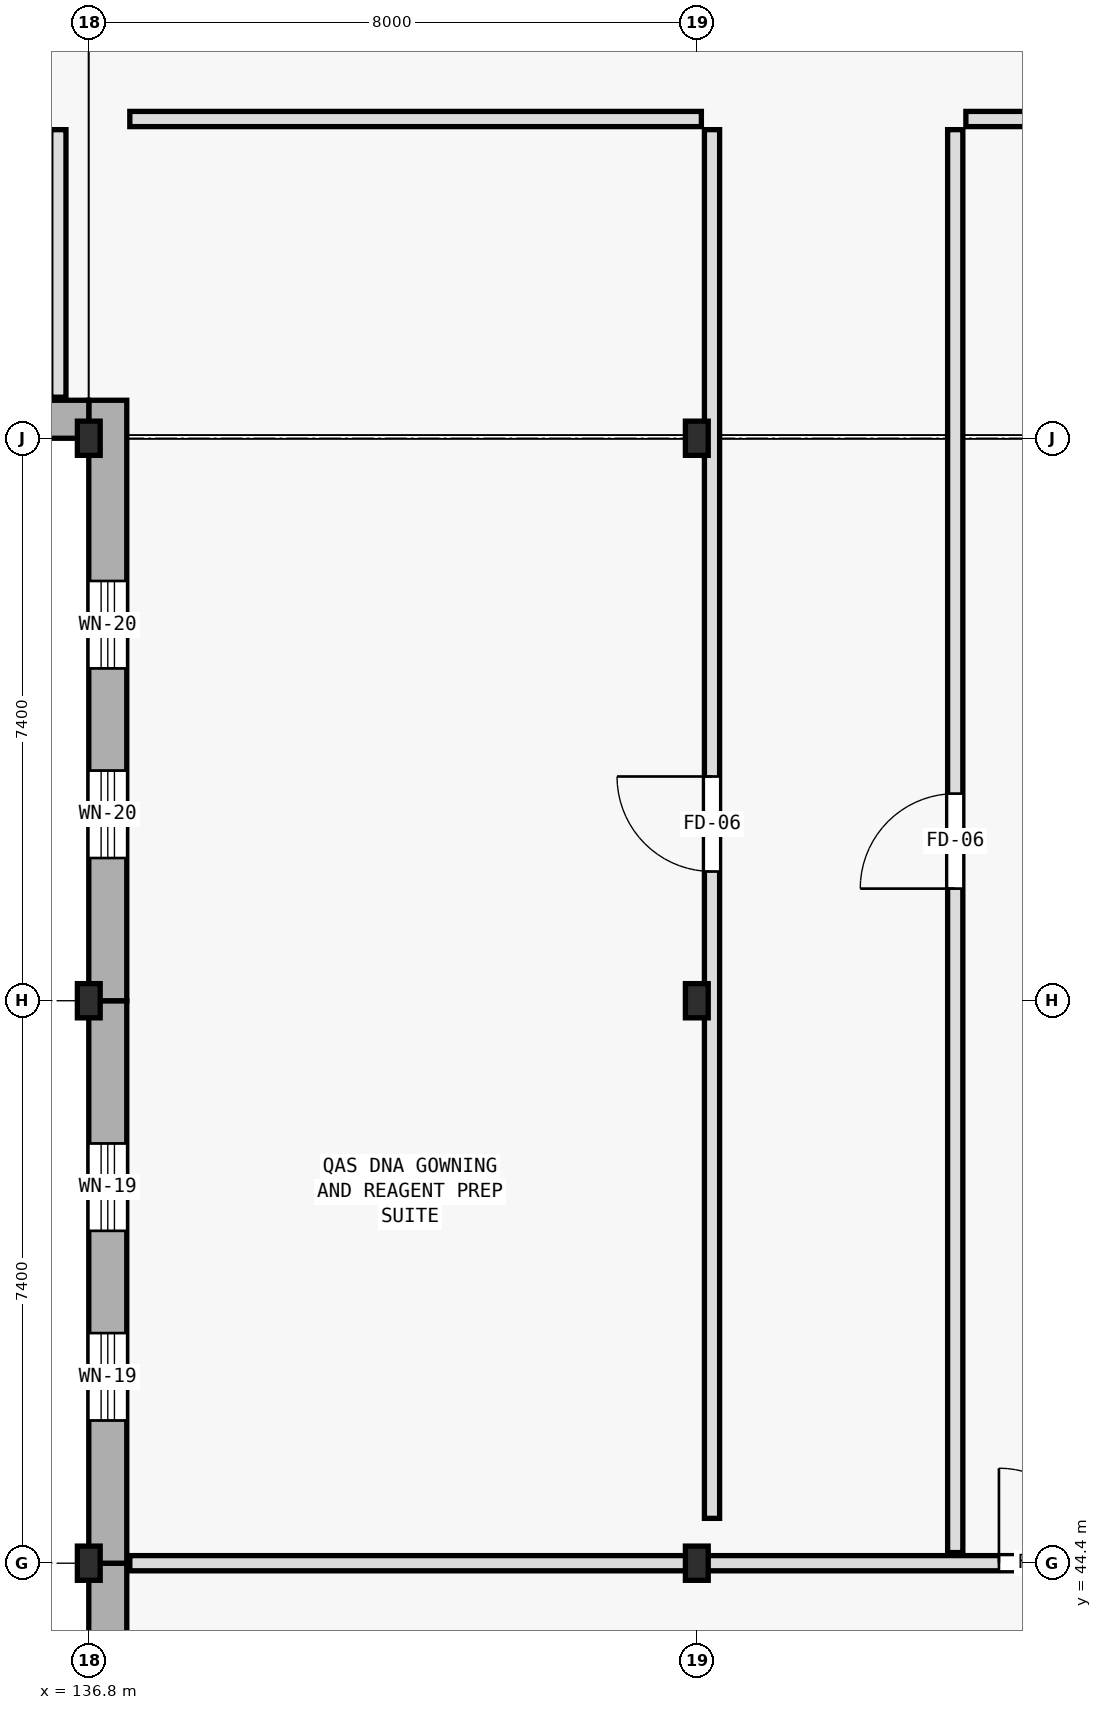
"""IFC4 building model, lengths in metres.
Left out: names, types, materials, properties, quantities, classifications, styles, units other than length and angle.
Written with IfcOpenShell. Run it as: python <this file> out.ifc"""

import sys

from ifc_helpers import new_model, si_unit, direction, frame, frame_2d, origin, origin_2d, place, context, subcontext, project, spatial, rectangle, i_section, extrude, element, fill, save


model = new_model("IFC4")
c1 = context("Model", 3, precision=1e-05, world=origin(), true_north=direction((0.0, 1.0)))
c2 = subcontext(c1, "Body", "Model", "MODEL_VIEW")
j1 = project(units=[si_unit("LENGTHUNIT", "METRE"), si_unit("PLANEANGLEUNIT", "RADIAN")], contexts=[c1])
p1 = place(None, origin())
s1 = spatial("IfcSite", under=j1, at=p1, CompositionType="ELEMENT")
p2 = place(p1, origin())
s2 = spatial("IfcBuilding", under=s1, at=p2, CompositionType="ELEMENT")
p3 = place(p2, frame((0.0, 0.0, 9.9)))
s3 = spatial("IfcBuildingStorey", under=s2, at=p3, CompositionType="ELEMENT", Elevation=9.9)
for number, where, z_axis, x_axis in (
    (1, (136.8, 44.4, 0.0), (0.0, 0.0, 1.0), (1.0, 0.0, 0.0)),
    (2, (136.8, 51.8, 0.0), (0.0, 0.0, 1.0), (1.0, 0.0, 0.0)),
    (3, (136.8, 59.2, 0.0), (0.0, 0.0, 1.0), (1.0, 0.0, 0.0)),
    (4, (144.8, 44.4, 0.0), (0.0, 0.0, 1.0), (1.0, 0.0, 0.0)),
    (5, (144.8, 51.8, 0.0), (0.0, 0.0, 1.0), (1.0, 0.0, 0.0)),
    (6, (144.8, 59.2, 0.0), (0.0, 0.0, 1.0), (1.0, 0.0, 0.0)),
):
    element("IfcColumn", number, at=place(p3, frame(where, z_axis=z_axis, x_axis=x_axis)), inside=s3, PredefinedType="COLUMN", context=c2, shape_type="SweptSolid", body=[
        extrude(i_section(OverallWidth=0.3, OverallDepth=0.45, WebThickness=0.014, FlangeThickness=0.026, FilletRadius=0.027, at=origin_2d()), origin(), (0.0, 0.0, 1.0), 4.2),
    ])
p4 = place(p3, frame((137.05, 37.0, 0.0), z_axis=(0.0, 0.0, 1.0), x_axis=(0.0, 1.0, 0.0)))
e7 = element("IfcWall", 7, at=p4, inside=s3, PredefinedType="STANDARD", context=c2, shape_type="SweptSolid", body=[
    extrude(rectangle(XDim=7.4, YDim=0.5, at=frame_2d((3.7, 0.0))), origin(), (0.0, 0.0, 1.0), 3.92),
])
p5 = place(p4, frame((1.978, 0.0, 0.9)))
e8 = element("IfcOpeningElement", 8, at=p5, cuts=e7, PredefinedType="OPENING", context=c2, shape_type="SweptSolid", body=[
    extrude(rectangle(XDim=0.95, YDim=2.2, at=frame_2d((0.475, 1.1))), frame((0.0, 0.26, 0.0), z_axis=(0.0, -1.0, 0.0), x_axis=(1.0, 0.0, 0.0)), (0.0, 0.0, 1.0), 0.52),
])
p6 = place(p4, frame((4.472, 0.0, 0.9)))
e9 = element("IfcOpeningElement", 9, at=p6, cuts=e7, PredefinedType="OPENING", context=c2, shape_type="SweptSolid", body=[
    extrude(rectangle(XDim=0.95, YDim=2.2, at=frame_2d((0.475, 1.1))), frame((0.0, 0.26, 0.0), z_axis=(0.0, -1.0, 0.0), x_axis=(1.0, 0.0, 0.0)), (0.0, 0.0, 1.0), 0.52),
])
p7 = place(p3, frame((137.05, 44.4, 0.0), z_axis=(0.0, 0.0, 1.0), x_axis=(0.0, 1.0, 0.0)))
e10 = element("IfcWall", 10, at=p7, inside=s3, PredefinedType="STANDARD", context=c2, shape_type="SweptSolid", body=[
    extrude(rectangle(XDim=7.4, YDim=0.5, at=frame_2d((3.7, 0.0))), origin(), (0.0, 0.0, 1.0), 3.955),
])
p8 = place(p7, frame((1.878, 0.0, 1.35)))
e11 = element("IfcOpeningElement", 11, at=p8, cuts=e10, PredefinedType="OPENING", context=c2, shape_type="SweptSolid", body=[
    extrude(rectangle(XDim=1.15, YDim=1.5, at=frame_2d((0.575, 0.75))), frame((0.0, 0.26, 0.0), z_axis=(0.0, -1.0, 0.0), x_axis=(1.0, 0.0, 0.0)), (0.0, 0.0, 1.0), 0.52),
])
p9 = place(p7, frame((4.372, 0.0, 1.35)))
e12 = element("IfcOpeningElement", 12, at=p9, cuts=e10, PredefinedType="OPENING", context=c2, shape_type="SweptSolid", body=[
    extrude(rectangle(XDim=1.15, YDim=1.5, at=frame_2d((0.575, 0.75))), frame((0.0, 0.26, 0.0), z_axis=(0.0, -1.0, 0.0), x_axis=(1.0, 0.0, 0.0)), (0.0, 0.0, 1.0), 0.52),
])
p10 = place(p3, frame((137.05, 51.8, 0.0), z_axis=(0.0, 0.0, 1.0), x_axis=(0.0, 1.0, 0.0)))
e13 = element("IfcWall", 13, at=p10, inside=s3, PredefinedType="STANDARD", context=c2, shape_type="SweptSolid", body=[
    extrude(rectangle(XDim=7.9, YDim=0.5, at=frame_2d((3.95, 0.0))), origin(), (0.0, 0.0, 1.0), 3.955),
])
p11 = place(p10, frame((1.878, 0.0, 0.9)))
e14 = element("IfcOpeningElement", 14, at=p11, cuts=e13, PredefinedType="OPENING", context=c2, shape_type="SweptSolid", body=[
    extrude(rectangle(XDim=1.15, YDim=1.85, at=frame_2d((0.575, 0.925))), frame((0.0, 0.26, 0.0), z_axis=(0.0, -1.0, 0.0), x_axis=(1.0, 0.0, 0.0)), (0.0, 0.0, 1.0), 0.52),
])
p12 = place(p10, frame((4.372, 0.0, 0.9)))
e15 = element("IfcOpeningElement", 15, at=p12, cuts=e13, PredefinedType="OPENING", context=c2, shape_type="SweptSolid", body=[
    extrude(rectangle(XDim=1.15, YDim=1.85, at=frame_2d((0.575, 0.925))), frame((0.0, 0.26, 0.0), z_axis=(0.0, -1.0, 0.0), x_axis=(1.0, 0.0, 0.0)), (0.0, 0.0, 1.0), 0.52),
])
p13 = place(p3, frame((136.8, 59.45, 0.0), z_axis=(0.0, 0.0, 1.0), x_axis=(-1.0, 0.0, 0.0)))
e16 = element("IfcWall", 16, at=p13, inside=s3, PredefinedType="STANDARD", context=c2, shape_type="SweptSolid", body=[
    extrude(rectangle(XDim=8.0, YDim=0.5, at=frame_2d((4.0, 0.0))), origin(), (0.0, 0.0, 1.0), 3.955),
])
p14 = place(p13, frame((1.993, 0.0, 1.35)))
e17 = element("IfcOpeningElement", 17, at=p14, cuts=e16, PredefinedType="OPENING", context=c2, shape_type="SweptSolid", body=[
    extrude(rectangle(XDim=1.25, YDim=1.65, at=frame_2d((0.625, 0.825))), frame((0.0, 0.26, 0.0), z_axis=(0.0, -1.0, 0.0), x_axis=(1.0, 0.0, 0.0)), (0.0, 0.0, 1.0), 0.52),
])
p15 = place(p13, frame((4.757, 0.0, 1.35)))
e18 = element("IfcOpeningElement", 18, at=p15, cuts=e16, PredefinedType="OPENING", context=c2, shape_type="SweptSolid", body=[
    extrude(rectangle(XDim=1.25, YDim=1.65, at=frame_2d((0.625, 0.825))), frame((0.0, 0.26, 0.0), z_axis=(0.0, -1.0, 0.0), x_axis=(1.0, 0.0, 0.0)), (0.0, 0.0, 1.0), 0.52),
])
p16 = place(p3, frame((136.4, 59.74, 0.0), z_axis=(0.0, 0.0, 1.0), x_axis=(0.0, 1.0, 0.0)))
e19 = element("IfcWall", 19, at=p16, inside=s3, PredefinedType="STANDARD", context=c2, shape_type="SweptSolid", body=[
    extrude(rectangle(XDim=3.52, YDim=0.2, at=frame_2d((1.76, 0.0))), origin(), (0.0, 0.0, 1.0), 3.92),
])
p17 = place(p3, frame((137.34, 44.4, 0.0), z_axis=(0.0, 0.0, 1.0), x_axis=(1.0, 0.0, 0.0)))
e20 = element("IfcWall", 20, at=p17, inside=s3, PredefinedType="STANDARD", context=c2, shape_type="SweptSolid", body=[
    extrude(rectangle(XDim=24.12, YDim=0.2, at=frame_2d((12.06, 0.0))), origin(), (0.0, 0.0, 1.0), 3.35),
])
p18 = place(p17, frame((11.435, 0.0, 0.0)))
e21 = element("IfcOpeningElement", 21, at=p18, cuts=e20, PredefinedType="OPENING", context=c2, shape_type="SweptSolid", body=[
    extrude(rectangle(XDim=1.25, YDim=2.3, at=frame_2d((0.625, 1.15))), frame((0.0, 0.11, 0.0), z_axis=(0.0, -1.0, 0.0), x_axis=(1.0, 0.0, 0.0)), (0.0, 0.0, 1.0), 0.22),
])
p19 = place(p3, frame((137.34, 63.4, 0.0), z_axis=(0.0, 0.0, 1.0), x_axis=(1.0, 0.0, 0.0)))
e22 = element("IfcWall", 22, at=p19, inside=s3, PredefinedType="STANDARD", context=c2, shape_type="SweptSolid", body=[
    extrude(rectangle(XDim=7.52, YDim=0.2, at=frame_2d((3.76, 0.0))), origin(), (0.0, 0.0, 1.0), 3.445),
])
p20 = place(p3, frame((145.0, 44.99, 0.0), z_axis=(0.0, 0.0, 1.0), x_axis=(0.0, 1.0, 0.0)))
e23 = element("IfcWall", 23, at=p20, inside=s3, PredefinedType="STANDARD", context=c2, shape_type="SweptSolid", body=[
    extrude(rectangle(XDim=18.27, YDim=0.2, at=frame_2d((9.135, 0.0))), origin(), (0.0, 0.0, 1.0), 3.385),
])
p21 = place(p20, frame((8.51, 0.0, 0.0)))
e24 = element("IfcOpeningElement", 24, at=p21, cuts=e23, PredefinedType="OPENING", context=c2, shape_type="SweptSolid", body=[
    extrude(rectangle(XDim=1.25, YDim=2.3, at=frame_2d((0.625, 1.15))), frame((0.0, 0.11, 0.0), z_axis=(0.0, -1.0, 0.0), x_axis=(1.0, 0.0, 0.0)), (0.0, 0.0, 1.0), 0.22),
])
p22 = place(p3, frame((148.34, 63.4, 0.0), z_axis=(0.0, 0.0, 1.0), x_axis=(1.0, 0.0, 0.0)))
e25 = element("IfcWall", 25, at=p22, inside=s3, PredefinedType="STANDARD", context=c2, shape_type="SweptSolid", body=[
    extrude(rectangle(XDim=13.12, YDim=0.2, at=frame_2d((6.56, 0.0))), origin(), (0.0, 0.0, 1.0), 3.445),
])
p23 = place(p3, frame((148.2, 44.54, 0.0), z_axis=(0.0, 0.0, 1.0), x_axis=(0.0, 1.0, 0.0)))
e26 = element("IfcWall", 26, at=p23, inside=s3, PredefinedType="STANDARD", context=c2, shape_type="SweptSolid", body=[
    extrude(rectangle(XDim=18.72, YDim=0.2, at=frame_2d((9.36, 0.0))), origin(), (0.0, 0.0, 1.0), 3.35),
])
p24 = place(p23, frame((8.735, 0.0, 0.0)))
e27 = element("IfcOpeningElement", 27, at=p24, cuts=e26, PredefinedType="OPENING", context=c2, shape_type="SweptSolid", body=[
    extrude(rectangle(XDim=1.25, YDim=2.3, at=frame_2d((0.625, 1.15))), frame((0.0, 0.11, 0.0), z_axis=(0.0, -1.0, 0.0), x_axis=(1.0, 0.0, 0.0)), (0.0, 0.0, 1.0), 0.22),
])
p25 = place(p8, origin())
e28 = element("IfcWindow", 28, at=p25, inside=s3, PartitioningType="SINGLE_PANEL", PredefinedType="WINDOW", context=c2, shape_type="SweptSolid", body=[
    extrude(rectangle(XDim=1.15, YDim=1.5, at=frame_2d((0.575, 0.75))), frame((0.0, 0.03, 0.0), z_axis=(0.0, -1.0, 0.0), x_axis=(1.0, 0.0, 0.0)), (0.0, 0.0, 1.0), 0.06),
])
fill(e11, e28)
p26 = place(p9, origin())
e29 = element("IfcWindow", 29, at=p26, inside=s3, PartitioningType="SINGLE_PANEL", PredefinedType="WINDOW", context=c2, shape_type="SweptSolid", body=[
    extrude(rectangle(XDim=1.15, YDim=1.5, at=frame_2d((0.575, 0.75))), frame((0.0, 0.03, 0.0), z_axis=(0.0, -1.0, 0.0), x_axis=(1.0, 0.0, 0.0)), (0.0, 0.0, 1.0), 0.06),
])
fill(e12, e29)
p27 = place(p11, origin())
e30 = element("IfcWindow", 30, at=p27, inside=s3, PartitioningType="SINGLE_PANEL", PredefinedType="WINDOW", context=c2, shape_type="SweptSolid", body=[
    extrude(rectangle(XDim=1.15, YDim=1.85, at=frame_2d((0.575, 0.925))), frame((0.0, 0.03, 0.0), z_axis=(0.0, -1.0, 0.0), x_axis=(1.0, 0.0, 0.0)), (0.0, 0.0, 1.0), 0.06),
])
fill(e14, e30)
p28 = place(p12, origin())
e31 = element("IfcWindow", 31, at=p28, inside=s3, PartitioningType="SINGLE_PANEL", PredefinedType="WINDOW", context=c2, shape_type="SweptSolid", body=[
    extrude(rectangle(XDim=1.15, YDim=1.85, at=frame_2d((0.575, 0.925))), frame((0.0, 0.03, 0.0), z_axis=(0.0, -1.0, 0.0), x_axis=(1.0, 0.0, 0.0)), (0.0, 0.0, 1.0), 0.06),
])
fill(e15, e31)
p29 = place(p18, origin())
e32 = element("IfcDoor", 32, at=p29, inside=s3, OperationType="SINGLE_SWING_LEFT", PredefinedType="DOOR", context=c2, shape_type="SweptSolid", body=[
    extrude(rectangle(XDim=1.25, YDim=2.3, at=frame_2d((0.625, 1.15))), frame((0.0, 0.025, 0.0), z_axis=(0.0, -1.0, 0.0), x_axis=(1.0, 0.0, 0.0)), (0.0, 0.0, 1.0), 0.05),
])
fill(e21, e32)
p30 = place(p21, origin())
e33 = element("IfcDoor", 33, at=p30, inside=s3, OperationType="SINGLE_SWING_RIGHT", PredefinedType="DOOR", context=c2, shape_type="SweptSolid", body=[
    extrude(rectangle(XDim=1.25, YDim=2.3, at=frame_2d((0.625, 1.15))), frame((0.0, 0.025, 0.0), z_axis=(0.0, -1.0, 0.0), x_axis=(1.0, 0.0, 0.0)), (0.0, 0.0, 1.0), 0.05),
])
fill(e24, e33)
p31 = place(p24, origin())
e34 = element("IfcDoor", 34, at=p31, inside=s3, OperationType="SINGLE_SWING_LEFT", PredefinedType="DOOR", context=c2, shape_type="SweptSolid", body=[
    extrude(rectangle(XDim=1.25, YDim=2.3, at=frame_2d((0.625, 1.15))), frame((0.0, 0.025, 0.0), z_axis=(0.0, -1.0, 0.0), x_axis=(1.0, 0.0, 0.0)), (0.0, 0.0, 1.0), 0.05),
])
fill(e27, e34)
save(model, sys.argv[1])
